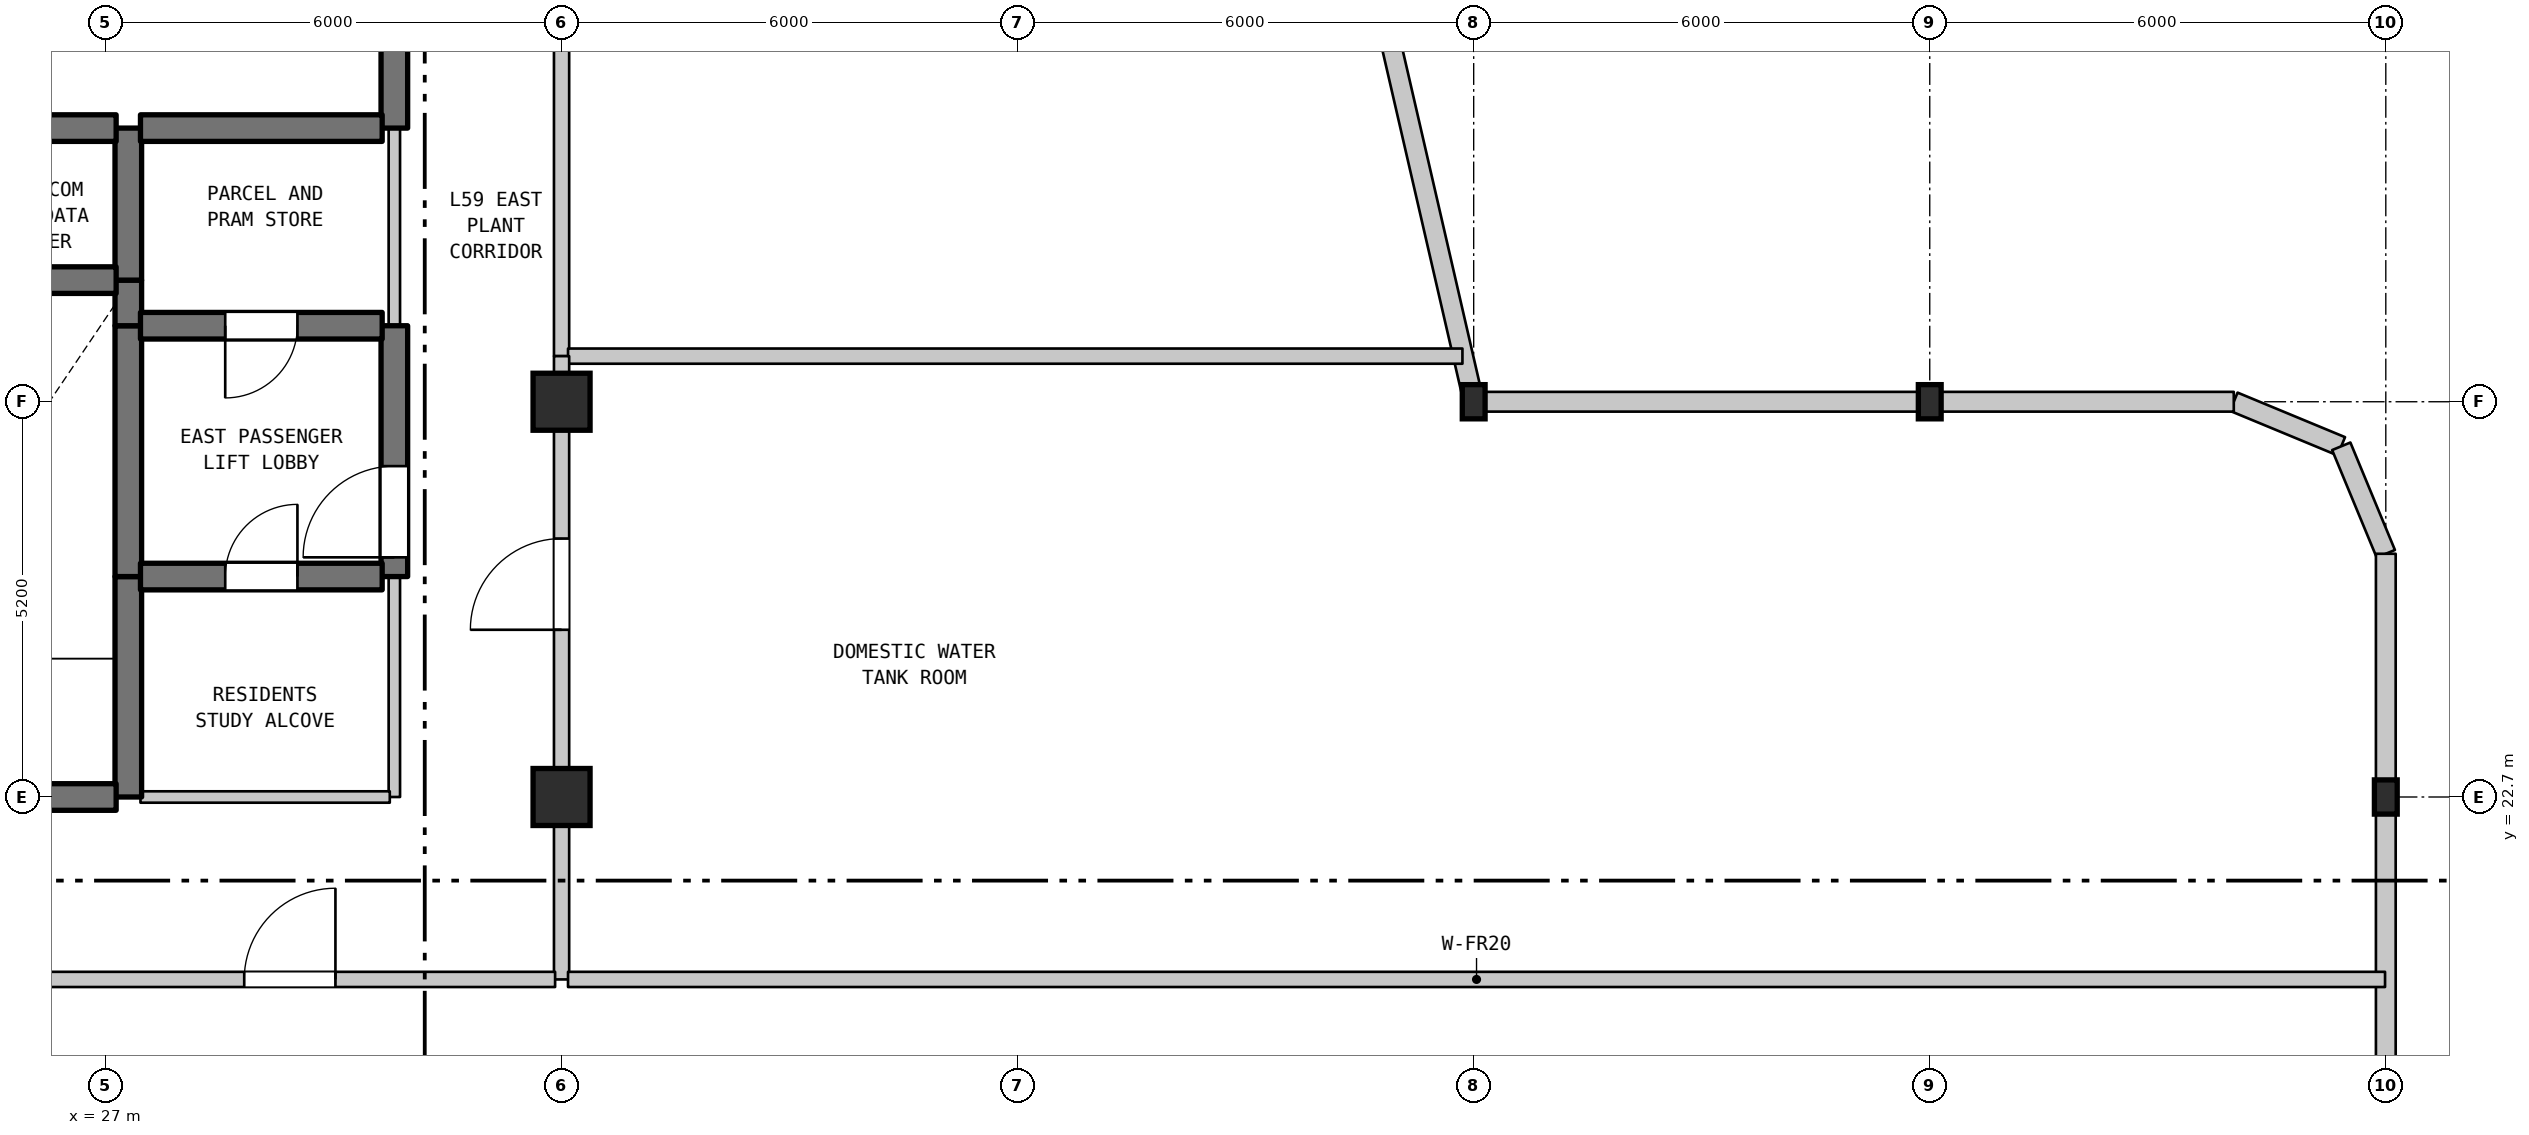
"""IFC4 building model, lengths in metres.
Left out: names, types, materials, properties, quantities, classifications, styles, units other than length and angle.
Written with IfcOpenShell. Run it as: python <this file> out.ifc"""

import sys

from ifc_helpers import new_model, si_unit, direction, frame, frame_2d, origin, origin_2d, place, context, subcontext, project, spatial, rectangle, i_section, extrude, element, fill, save


model = new_model("IFC4")
c1 = context("Model", 3, precision=1e-05, world=origin(), true_north=direction((0.0, 1.0)))
c2 = subcontext(c1, "Body", "Model", "MODEL_VIEW")
j1 = project(units=[si_unit("LENGTHUNIT", "METRE"), si_unit("PLANEANGLEUNIT", "RADIAN")], contexts=[c1])
p1 = place(None, origin())
s1 = spatial("IfcSite", under=j1, at=p1, CompositionType="ELEMENT")
p2 = place(p1, origin())
s2 = spatial("IfcBuilding", under=s1, at=p2, CompositionType="ELEMENT")
p3 = place(p2, frame((0.0, 0.0, 237.6)))
s3 = spatial("IfcBuildingStorey", under=s2, at=p3, CompositionType="ELEMENT", Elevation=237.6)
for number, where, z_axis, x_axis in (
    (1, (33.0, 22.7, 0.0), (0.0, 0.0, 1.0), (1.0, 0.0, 0.0)),
    (2, (33.0, 27.9, 0.0), (0.0, 0.0, 1.0), (1.0, 0.0, 0.0)),
):
    element("IfcColumn", number, at=place(p3, frame(where, z_axis=z_axis, x_axis=x_axis)), inside=s3, PredefinedType="COLUMN", context=c2, shape_type="SweptSolid", body=[
        extrude(rectangle(XDim=0.75, YDim=0.75, at=origin_2d()), origin(), (0.0, 0.0, 1.0), 5.2),
    ])
for number, where, z_axis, x_axis in (
    (3, (45.0, 27.9, 0.0), (0.0, 0.0, 1.0), (1.0, 0.0, 0.0)),
    (4, (51.0, 27.9, 0.0), (0.0, 0.0, 1.0), (1.0, 0.0, 0.0)),
    (5, (57.0, 22.7, 0.0), (0.0, 0.0, 1.0), (1.0, 0.0, 0.0)),
):
    element("IfcColumn", number, at=place(p3, frame(where, z_axis=z_axis, x_axis=x_axis)), inside=s3, PredefinedType="COLUMN", context=c2, shape_type="SweptSolid", body=[
        extrude(i_section(OverallWidth=0.3, OverallDepth=0.45, WebThickness=0.014, FlangeThickness=0.026, FilletRadius=0.027, at=origin_2d()), origin(), (0.0, 0.0, 1.0), 5.2),
    ])
for number, where, z_axis, x_axis in (
    (6, (55.0, 27.9, 0.0), (0.0, 0.0, 1.0), (0.924, -0.383, 0.0)),
    (7, (56.414, 27.314, 0.0), (0.0, 0.0, 1.0), (0.383, -0.924, 0.0)),
):
    element("IfcWall", number, at=place(p3, frame(where, z_axis=z_axis, x_axis=x_axis)), inside=s3, PredefinedType="STANDARD", context=c2, shape_type="SweptSolid", body=[
        extrude(rectangle(XDim=1.531, YDim=0.26, at=frame_2d((0.765, 0.0))), origin(), (0.0, 0.0, 1.0), 4.88),
    ])
p4 = place(p3, frame((57.0, 25.9, 0.0), z_axis=(0.0, 0.0, 1.0), x_axis=(0.0, -1.0, 0.0)))
e8 = element("IfcWall", 8, at=p4, inside=s3, PredefinedType="STANDARD", context=c2, shape_type="SweptSolid", body=[
    extrude(rectangle(XDim=23.2, YDim=0.26, at=frame_2d((11.6, 0.0))), origin(), (0.0, 0.0, 1.0), 4.88),
])
p5 = place(p3, frame((39.358, 52.35, 0.0), z_axis=(0.0, 0.0, 1.0), x_axis=(0.224849558511, -0.974393491377, 0.0)))
e9 = element("IfcWall", 9, at=p5, inside=s3, PredefinedType="STANDARD", context=c2, shape_type="SweptSolid", body=[
    extrude(rectangle(XDim=25.093, YDim=0.26, at=frame_2d((12.546, 0.0))), origin(), (0.0, 0.0, 1.0), 4.88),
])
p6 = place(p3, frame((45.0, 27.9, 0.0), z_axis=(0.0, 0.0, 1.0), x_axis=(1.0, 0.0, 0.0)))
e10 = element("IfcWall", 10, at=p6, inside=s3, PredefinedType="STANDARD", context=c2, shape_type="SweptSolid", body=[
    extrude(rectangle(XDim=10.0, YDim=0.26, at=frame_2d((5.0, 0.0))), origin(), (0.0, 0.0, 1.0), 4.88),
])
p7 = place(p3, frame((27.3, 22.7, 0.0), z_axis=(0.0, 0.0, 1.0), x_axis=(0.0, 1.0, 0.0)))
e11 = element("IfcWall", 11, at=p7, inside=s3, PredefinedType="SHEAR", context=c2, shape_type="SweptSolid", body=[
    extrude(rectangle(XDim=2.9, YDim=0.35, at=frame_2d((1.45, 0.0))), origin(), (0.0, 0.0, 1.0), 4.88),
])
p8 = place(p3, frame((27.3, 25.6, 0.0), z_axis=(0.0, 0.0, 1.0), x_axis=(0.0, 1.0, 0.0)))
e12 = element("IfcWall", 12, at=p8, inside=s3, PredefinedType="SHEAR", context=c2, shape_type="SweptSolid", body=[
    extrude(rectangle(XDim=3.3, YDim=0.35, at=frame_2d((1.65, 0.0))), origin(), (0.0, 0.0, 1.0), 4.88),
])
p9 = place(p3, frame((27.3, 28.9, 0.0), z_axis=(0.0, 0.0, 1.0), x_axis=(0.0, 1.0, 0.0)))
e13 = element("IfcWall", 13, at=p9, inside=s3, PredefinedType="SHEAR", context=c2, shape_type="SweptSolid", body=[
    extrude(rectangle(XDim=0.6, YDim=0.35, at=frame_2d((0.3, 0.0))), origin(), (0.0, 0.0, 1.0), 4.88),
])
p10 = place(p3, frame((27.3, 29.5, 0.0), z_axis=(0.0, 0.0, 1.0), x_axis=(0.0, 1.0, 0.0)))
e14 = element("IfcWall", 14, at=p10, inside=s3, PredefinedType="SHEAR", context=c2, shape_type="SweptSolid", body=[
    extrude(rectangle(XDim=2.0, YDim=0.35, at=frame_2d((1.0, 0.0))), origin(), (0.0, 0.0, 1.0), 4.88),
])
p11 = place(p3, frame((30.8, 22.7, 0.0), z_axis=(0.0, 0.0, 1.0), x_axis=(0.0, 1.0, 0.0)))
e15 = element("IfcWall", 15, at=p11, inside=s3, PredefinedType="STANDARD", context=c2, shape_type="SweptSolid", body=[
    extrude(rectangle(XDim=2.9, YDim=0.15, at=frame_2d((1.45, 0.0))), origin(), (0.0, 0.0, 1.0), 4.88),
])
p12 = place(p3, frame((30.8, 25.6, 0.0), z_axis=(0.0, 0.0, 1.0), x_axis=(0.0, 1.0, 0.0)))
e16 = element("IfcWall", 16, at=p12, inside=s3, PredefinedType="SHEAR", context=c2, shape_type="SweptSolid", body=[
    extrude(rectangle(XDim=3.3, YDim=0.35, at=frame_2d((1.65, 0.0))), origin(), (0.0, 0.0, 1.0), 4.88),
])
p13 = place(p12, frame((0.253, 0.0, 0.0)))
e17 = element("IfcOpeningElement", 17, at=p13, cuts=e16, PredefinedType="OPENING", context=c2, shape_type="SweptSolid", body=[
    extrude(rectangle(XDim=1.2, YDim=2.2, at=frame_2d((0.6, 1.1))), frame((0.0, 0.185, 0.0), z_axis=(0.0, -1.0, 0.0), x_axis=(1.0, 0.0, 0.0)), (0.0, 0.0, 1.0), 0.37),
])
p14 = place(p3, frame((30.8, 28.9, 0.0), z_axis=(0.0, 0.0, 1.0), x_axis=(0.0, 1.0, 0.0)))
e18 = element("IfcWall", 18, at=p14, inside=s3, PredefinedType="STANDARD", context=c2, shape_type="SweptSolid", body=[
    extrude(rectangle(XDim=2.6, YDim=0.15, at=frame_2d((1.3, 0.0))), origin(), (0.0, 0.0, 1.0), 4.88),
])
p15 = place(p3, frame((30.8, 31.5, 0.0), z_axis=(0.0, 0.0, 1.0), x_axis=(0.0, 1.0, 0.0)))
e19 = element("IfcWall", 19, at=p15, inside=s3, PredefinedType="SHEAR", context=c2, shape_type="SweptSolid", body=[
    extrude(rectangle(XDim=3.5, YDim=0.35, at=frame_2d((1.75, 0.0))), origin(), (0.0, 0.0, 1.0), 4.88),
])
p16 = place(p15, frame((1.15, 0.0, 0.0)))
e20 = element("IfcOpeningElement", 20, at=p16, cuts=e19, PredefinedType="OPENING", context=c2, shape_type="SweptSolid", body=[
    extrude(rectangle(XDim=1.2, YDim=2.2, at=frame_2d((0.6, 1.1))), frame((0.0, 0.185, 0.0), z_axis=(0.0, -1.0, 0.0), x_axis=(1.0, 0.0, 0.0)), (0.0, 0.0, 1.0), 0.37),
])
p17 = place(p3, frame((33.0, 20.3, 0.0), z_axis=(0.0, 0.0, 1.0), x_axis=(0.0, 1.0, 0.0)))
e21 = element("IfcWall", 21, at=p17, inside=s3, PredefinedType="STANDARD", context=c2, shape_type="SweptSolid", body=[
    extrude(rectangle(XDim=7.6, YDim=0.2, at=frame_2d((3.8, 0.0))), origin(), (0.0, 0.0, 1.0), 4.59),
])
p18 = place(p17, frame((4.6, 0.0, 0.0)))
e22 = element("IfcOpeningElement", 22, at=p18, cuts=e21, PredefinedType="OPENING", context=c2, shape_type="SweptSolid", body=[
    extrude(rectangle(XDim=1.2, YDim=2.2, at=frame_2d((0.6, 1.1))), frame((0.0, 0.11, 0.0), z_axis=(0.0, -1.0, 0.0), x_axis=(1.0, 0.0, 0.0)), (0.0, 0.0, 1.0), 0.22),
])
p19 = place(p3, frame((33.0, 28.5, 0.0), z_axis=(0.0, 0.0, 1.0), x_axis=(0.0, 1.0, 0.0)))
e23 = element("IfcWall", 23, at=p19, inside=s3, PredefinedType="STANDARD", context=c2, shape_type="SweptSolid", body=[
    extrude(rectangle(XDim=9.4, YDim=0.2, at=frame_2d((4.7, 0.0))), origin(), (0.0, 0.0, 1.0), 4.38),
])
p20 = place(p19, frame((5.3, 0.0, 0.0)))
e24 = element("IfcOpeningElement", 24, at=p20, cuts=e23, PredefinedType="OPENING", context=c2, shape_type="SweptSolid", body=[
    extrude(rectangle(XDim=1.2, YDim=2.2, at=frame_2d((0.6, 1.1))), frame((0.0, 0.11, 0.0), z_axis=(0.0, -1.0, 0.0), x_axis=(1.0, 0.0, 0.0)), (0.0, 0.0, 1.0), 0.22),
])
p21 = place(p3, frame((12.6, 20.3, 0.0), z_axis=(0.0, 0.0, 1.0), x_axis=(1.0, 0.0, 0.0)))
e25 = element("IfcWall", 25, at=p21, inside=s3, PredefinedType="STANDARD", context=c2, shape_type="SweptSolid", body=[
    extrude(rectangle(XDim=20.315, YDim=0.2, at=frame_2d((10.157, 0.0))), origin(), (0.0, 0.0, 1.0), 4.88),
])
p22 = place(p21, frame((6.8, 0.0, 0.0)))
e26 = element("IfcOpeningElement", 26, at=p22, cuts=e25, PredefinedType="OPENING", context=c2, shape_type="SweptSolid", body=[
    extrude(rectangle(XDim=1.2, YDim=2.2, at=frame_2d((0.6, 1.1))), frame((0.0, 0.11, 0.0), z_axis=(0.0, -1.0, 0.0), x_axis=(1.0, 0.0, 0.0)), (0.0, 0.0, 1.0), 0.22),
])
p23 = place(p21, frame((16.225, 0.0, 0.0)))
e27 = element("IfcOpeningElement", 27, at=p23, cuts=e25, PredefinedType="OPENING", context=c2, shape_type="SweptSolid", body=[
    extrude(rectangle(XDim=1.2, YDim=2.2, at=frame_2d((0.6, 1.1))), frame((0.0, 0.11, 0.0), z_axis=(0.0, -1.0, 0.0), x_axis=(1.0, 0.0, 0.0)), (0.0, 0.0, 1.0), 0.22),
])
p24 = place(p3, frame((33.085, 20.3, 0.0), z_axis=(0.0, 0.0, 1.0), x_axis=(1.0, 0.0, 0.0)))
e28 = element("IfcWall", 28, at=p24, inside=s3, PredefinedType="STANDARD", context=c2, shape_type="SweptSolid", body=[
    extrude(rectangle(XDim=23.905, YDim=0.2, at=frame_2d((11.953, 0.0))), origin(), (0.0, 0.0, 1.0), 4.88),
])
p25 = place(p3, frame((23.96, 22.7, 0.0), z_axis=(0.0, 0.0, 1.0), x_axis=(1.0, 0.0, 0.0)))
e29 = element("IfcWall", 29, at=p25, inside=s3, PredefinedType="SHEAR", context=c2, shape_type="SweptSolid", body=[
    extrude(rectangle(XDim=3.18, YDim=0.35, at=frame_2d((1.59, 0.0))), origin(), (0.0, 0.0, 1.0), 4.88),
])
p26 = place(p3, frame((27.46, 22.7, 0.0), z_axis=(0.0, 0.0, 1.0), x_axis=(1.0, 0.0, 0.0)))
e30 = element("IfcWall", 30, at=p26, inside=s3, PredefinedType="STANDARD", context=c2, shape_type="SweptSolid", body=[
    extrude(rectangle(XDim=3.28, YDim=0.15, at=frame_2d((1.64, 0.0))), origin(), (0.0, 0.0, 1.0), 4.88),
])
p27 = place(p3, frame((27.46, 25.6, 0.0), z_axis=(0.0, 0.0, 1.0), x_axis=(1.0, 0.0, 0.0)))
e31 = element("IfcWall", 31, at=p27, inside=s3, PredefinedType="SHEAR", context=c2, shape_type="SweptSolid", body=[
    extrude(rectangle(XDim=3.18, YDim=0.35, at=frame_2d((1.59, 0.0))), origin(), (0.0, 0.0, 1.0), 4.88),
])
p28 = place(p27, frame((1.115, 0.0, 0.0)))
e32 = element("IfcOpeningElement", 32, at=p28, cuts=e31, PredefinedType="OPENING", context=c2, shape_type="SweptSolid", body=[
    extrude(rectangle(XDim=0.95, YDim=2.15, at=frame_2d((0.475, 1.075))), frame((0.0, 0.185, 0.0), z_axis=(0.0, -1.0, 0.0), x_axis=(1.0, 0.0, 0.0)), (0.0, 0.0, 1.0), 0.37),
])
p29 = place(p3, frame((33.085, 28.5, 0.0), z_axis=(0.0, 0.0, 1.0), x_axis=(1.0, 0.0, 0.0)))
e33 = element("IfcWall", 33, at=p29, inside=s3, PredefinedType="STANDARD", context=c2, shape_type="SweptSolid", body=[
    extrude(rectangle(XDim=11.767, YDim=0.2, at=frame_2d((5.884, 0.0))), origin(), (0.0, 0.0, 1.0), 4.88),
])
p30 = place(p3, frame((27.46, 28.9, 0.0), z_axis=(0.0, 0.0, 1.0), x_axis=(1.0, 0.0, 0.0)))
e34 = element("IfcWall", 34, at=p30, inside=s3, PredefinedType="SHEAR", context=c2, shape_type="SweptSolid", body=[
    extrude(rectangle(XDim=3.18, YDim=0.35, at=frame_2d((1.59, 0.0))), origin(), (0.0, 0.0, 1.0), 4.88),
])
p31 = place(p30, frame((1.115, 0.0, 0.0)))
e35 = element("IfcOpeningElement", 35, at=p31, cuts=e34, PredefinedType="OPENING", context=c2, shape_type="SweptSolid", body=[
    extrude(rectangle(XDim=0.95, YDim=2.15, at=frame_2d((0.475, 1.075))), frame((0.0, 0.185, 0.0), z_axis=(0.0, -1.0, 0.0), x_axis=(1.0, 0.0, 0.0)), (0.0, 0.0, 1.0), 0.37),
])
p32 = place(p3, frame((23.96, 29.5, 0.0), z_axis=(0.0, 0.0, 1.0), x_axis=(1.0, 0.0, 0.0)))
e36 = element("IfcWall", 36, at=p32, inside=s3, PredefinedType="SHEAR", context=c2, shape_type="SweptSolid", body=[
    extrude(rectangle(XDim=3.18, YDim=0.35, at=frame_2d((1.59, 0.0))), origin(), (0.0, 0.0, 1.0), 4.88),
])
p33 = place(p3, frame((23.96, 31.5, 0.0), z_axis=(0.0, 0.0, 1.0), x_axis=(1.0, 0.0, 0.0)))
e37 = element("IfcWall", 37, at=p33, inside=s3, PredefinedType="SHEAR", context=c2, shape_type="SweptSolid", body=[
    extrude(rectangle(XDim=3.18, YDim=0.35, at=frame_2d((1.59, 0.0))), origin(), (0.0, 0.0, 1.0), 4.88),
])
p34 = place(p33, frame((1.094, 0.0, 0.0)))
e38 = element("IfcOpeningElement", 38, at=p34, cuts=e37, PredefinedType="OPENING", context=c2, shape_type="SweptSolid", body=[
    extrude(rectangle(XDim=0.85, YDim=2.1, at=frame_2d((0.425, 1.05))), frame((0.0, 0.185, 0.0), z_axis=(0.0, -1.0, 0.0), x_axis=(1.0, 0.0, 0.0)), (0.0, 0.0, 1.0), 0.37),
])
p35 = place(p3, frame((27.46, 31.5, 0.0), z_axis=(0.0, 0.0, 1.0), x_axis=(1.0, 0.0, 0.0)))
e39 = element("IfcWall", 39, at=p35, inside=s3, PredefinedType="SHEAR", context=c2, shape_type="SweptSolid", body=[
    extrude(rectangle(XDim=3.18, YDim=0.35, at=frame_2d((1.59, 0.0))), origin(), (0.0, 0.0, 1.0), 4.88),
])
p36 = place(p3, frame((33.0, 27.9, 0.0), z_axis=(0.0, 0.0, 1.0), x_axis=(0.0, 1.0, 0.0)))
e40 = element("IfcWall", 40, at=p36, inside=s3, PredefinedType="STANDARD", context=c2, shape_type="SweptSolid", body=[
    extrude(rectangle(XDim=0.6, YDim=0.2, at=frame_2d((0.3, 0.0))), origin(), (0.0, 0.0, 1.0), 4.38),
])
p37 = place(p13, origin())
e41 = element("IfcDoor", 41, at=p37, inside=s3, OperationType="SINGLE_SWING_LEFT", PredefinedType="DOOR", context=c2, shape_type="SweptSolid", body=[
    extrude(rectangle(XDim=1.2, YDim=2.2, at=frame_2d((0.6, 1.1))), frame((0.0, 0.025, 0.0), z_axis=(0.0, -1.0, 0.0), x_axis=(1.0, 0.0, 0.0)), (0.0, 0.0, 1.0), 0.05),
])
fill(e17, e41)
p38 = place(p18, origin())
e42 = element("IfcDoor", 42, at=p38, inside=s3, OperationType="SINGLE_SWING_LEFT", PredefinedType="DOOR", context=c2, shape_type="SweptSolid", body=[
    extrude(rectangle(XDim=1.2, YDim=2.2, at=frame_2d((0.6, 1.1))), frame((0.0, 0.025, 0.0), z_axis=(0.0, -1.0, 0.0), x_axis=(1.0, 0.0, 0.0)), (0.0, 0.0, 1.0), 0.05),
])
fill(e22, e42)
p39 = place(p23, origin())
e43 = element("IfcDoor", 43, at=p39, inside=s3, OperationType="SINGLE_SWING_RIGHT", PredefinedType="DOOR", context=c2, shape_type="SweptSolid", body=[
    extrude(rectangle(XDim=1.2, YDim=2.2, at=frame_2d((0.6, 1.1))), frame((0.0, 0.025, 0.0), z_axis=(0.0, -1.0, 0.0), x_axis=(1.0, 0.0, 0.0)), (0.0, 0.0, 1.0), 0.05),
])
fill(e27, e43)
p40 = place(p28, origin())
e44 = element("IfcDoor", 44, at=p40, inside=s3, OperationType="SINGLE_SWING_RIGHT", PredefinedType="DOOR", context=c2, shape_type="SweptSolid", body=[
    extrude(rectangle(XDim=0.95, YDim=2.15, at=frame_2d((0.475, 1.075))), frame((0.0, 0.025, 0.0), z_axis=(0.0, -1.0, 0.0), x_axis=(1.0, 0.0, 0.0)), (0.0, 0.0, 1.0), 0.05),
])
fill(e32, e44)
p41 = place(p31, frame((0.95, 0.0, 0.0), z_axis=(0.0, 0.0, 1.0), x_axis=(-1.0, 0.0, 0.0)))
e45 = element("IfcDoor", 45, at=p41, inside=s3, OperationType="SINGLE_SWING_LEFT", PredefinedType="DOOR", context=c2, shape_type="SweptSolid", body=[
    extrude(rectangle(XDim=0.95, YDim=2.15, at=frame_2d((0.475, 1.075))), frame((0.0, 0.025, 0.0), z_axis=(0.0, -1.0, 0.0), x_axis=(1.0, 0.0, 0.0)), (0.0, 0.0, 1.0), 0.05),
])
fill(e35, e45)
save(model, sys.argv[1])
